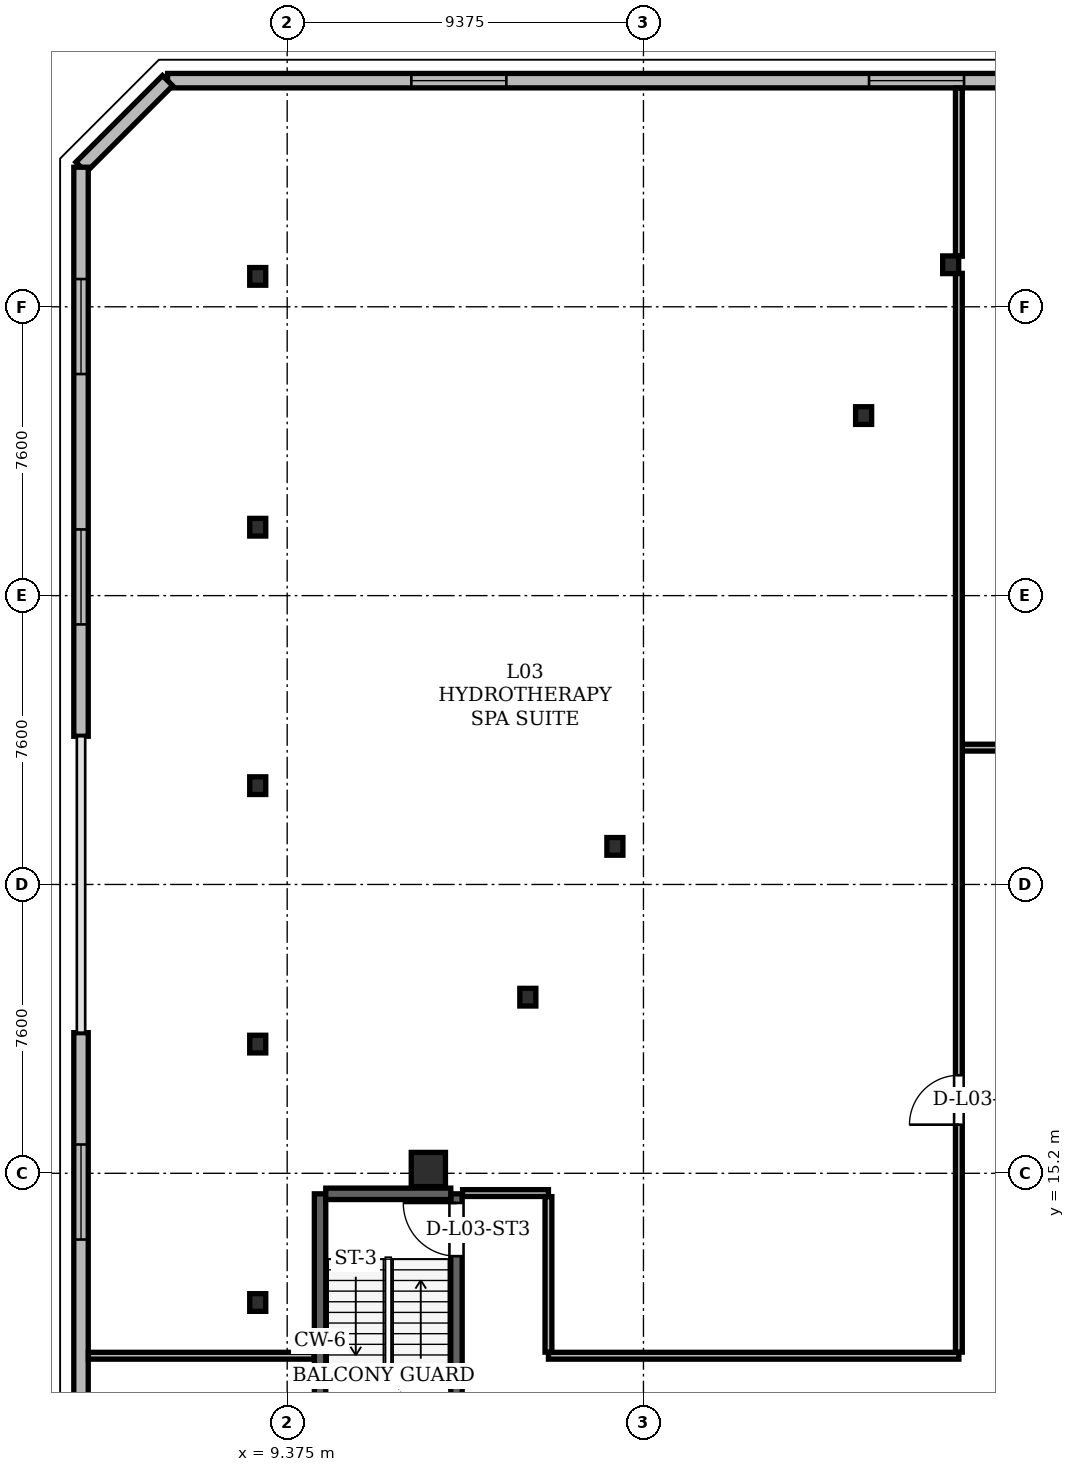
"""IFC4 building model, lengths in metres.
Left out: names, types, materials, properties, quantities, classifications, styles, units other than length and angle.
Written with IfcOpenShell. Run it as: python <this file> out.ifc"""

import sys

from ifc_helpers import new_model, si_unit, direction, frame, frame_2d, origin, origin_2d, place, context, subcontext, project, spatial, rectangle, hollow_rectangle, i_section, extrude, element, fill, save


model = new_model("IFC4")
c1 = context("Model", 3, precision=1e-05, world=origin(), true_north=direction((0.0, 1.0)))
c2 = subcontext(c1, "Body", "Model", "MODEL_VIEW")
j1 = project(units=[si_unit("LENGTHUNIT", "METRE"), si_unit("PLANEANGLEUNIT", "RADIAN")], contexts=[c1])
p1 = place(None, origin())
s1 = spatial("IfcSite", under=j1, at=p1, CompositionType="ELEMENT")
p2 = place(p1, origin())
s2 = spatial("IfcBuilding", under=s1, at=p2, CompositionType="ELEMENT")
p3 = place(p2, frame((0.0, 0.0, 14.1)))
s3 = spatial("IfcBuildingStorey", under=s2, at=p3, CompositionType="ELEMENT", Elevation=14.1)
p4 = place(p3, frame((13.09, 15.3, 0.004), z_axis=(0.0, 0.0, 1.0), x_axis=(1.0, 0.0, 0.0)))
e1 = element("IfcColumn", 1, at=p4, inside=s3, PredefinedType="COLUMN", context=c2, shape_type="SweptSolid", body=[
    extrude(hollow_rectangle(XDim=0.9, YDim=0.9, WallThickness=0.075, at=origin_2d()), origin(), (0.0, 0.0, 1.0), 4.191),
])
for number, where, z_axis, x_axis in (
    (2, (26.834, 39.106, 0.004), (0.0, 0.0, 1.0), (1.0, 0.0, 0.0)),
    (3, (24.543, 35.138, 0.004), (0.0, 0.0, 1.0), (1.0, 0.0, 0.0)),
    (4, (17.998, 23.802, 0.004), (0.0, 0.0, 1.0), (1.0, 0.0, 0.0)),
    (5, (15.708, 19.834, 0.004), (0.0, 0.0, 1.0), (1.0, 0.0, 0.0)),
):
    element("IfcColumn", number, at=place(p3, frame(where, z_axis=z_axis, x_axis=x_axis)), inside=s3, PredefinedType="COLUMN", context=c2, shape_type="SweptSolid", body=[
        extrude(i_section(OverallWidth=0.422, OverallDepth=0.465, WebThickness=0.045, FlangeThickness=0.072, at=origin_2d()), origin(), (0.0, 0.0, 1.0), 4.191),
    ])
for number, where, z_axis, x_axis in (
    (6, (8.6, 11.8, 0.0), (0.0, 0.0, 1.0), (1.0, 0.0, 0.0)),
    (7, (8.6, 18.6, 0.0), (0.0, 0.0, 1.0), (1.0, 0.0, 0.0)),
    (8, (8.6, 25.4, 0.0), (0.0, 0.0, 1.0), (1.0, 0.0, 0.0)),
    (9, (8.6, 32.2, 0.0), (0.0, 0.0, 1.0), (1.0, 0.0, 0.0)),
    (10, (8.6, 38.8, 0.0), (0.0, 0.0, 1.0), (1.0, 0.0, 0.0)),
):
    element("IfcColumn", number, at=place(p3, frame(where, z_axis=z_axis, x_axis=x_axis)), inside=s3, PredefinedType="COLUMN", context=c2, shape_type="SweptSolid", body=[
        extrude(i_section(OverallWidth=0.422, OverallDepth=0.465, WebThickness=0.045, FlangeThickness=0.072, at=origin_2d()), origin(), (0.0, 0.0, 1.0), 4.2),
    ])
p5 = place(p3, frame((10.24, 6.94, 0.0), z_axis=(0.0, 0.0, 1.0), x_axis=(0.0, 1.0, 0.0)))
e11 = element("IfcWall", 11, at=p5, inside=s3, PredefinedType="SHEAR", context=c2, shape_type="SweptSolid", body=[
    extrude(rectangle(XDim=7.72, YDim=0.3, at=frame_2d((3.86, 0.0))), origin(), (0.0, 0.0, 1.0), 3.92),
])
p6 = place(p3, frame((13.83, 6.94, 0.0), z_axis=(0.0, 0.0, 1.0), x_axis=(0.0, 1.0, 0.0)))
e12 = element("IfcWall", 12, at=p6, inside=s3, PredefinedType="SHEAR", context=c2, shape_type="SweptSolid", body=[
    extrude(rectangle(XDim=7.72, YDim=0.3, at=frame_2d((3.86, 0.0))), origin(), (0.0, 0.0, 1.0), 3.92),
])
p7 = place(p6, frame((6.08, 0.0, 0.0)))
e13 = element("IfcOpeningElement", 13, at=p7, cuts=e12, PredefinedType="OPENING", context=c2, shape_type="SweptSolid", body=[
    extrude(rectangle(XDim=1.4, YDim=2.2, at=frame_2d((0.7, 1.1))), frame((0.0, 0.15, 0.0), z_axis=(0.0, -1.0, 0.0), x_axis=(1.0, 0.0, 0.0)), (0.0, 0.0, 1.0), 0.3),
])
p8 = place(p3, frame((10.39, 14.66, 0.0), z_axis=(0.0, 0.0, 1.0), x_axis=(1.0, 0.0, 0.0)))
e14 = element("IfcWall", 14, at=p8, inside=s3, PredefinedType="SHEAR", context=c2, shape_type="SweptSolid", body=[
    extrude(rectangle(XDim=3.29, YDim=0.3, at=frame_2d((1.645, 0.0))), origin(), (0.0, 0.0, 1.0), 3.92),
])
p9 = place(p3, frame((33.6, 43.95, 0.0), z_axis=(0.0, 0.0, 1.0), x_axis=(-1.0, 0.0, 0.0)))
e15 = element("IfcWall", 15, at=p9, inside=s3, PredefinedType="SOLIDWALL", context=c2, shape_type="SweptSolid", body=[
    extrude(rectangle(XDim=27.372, YDim=0.38, at=frame_2d((13.686, 0.0))), origin(), (0.0, 0.0, 1.0), 3.054),
])
p10 = place(p9, frame((6.414, 0.0, 0.85)))
e16 = element("IfcOpeningElement", 16, at=p10, cuts=e15, PredefinedType="OPENING", context=c2, shape_type="SweptSolid", body=[
    extrude(rectangle(XDim=2.5, YDim=2.034, at=frame_2d((1.25, 1.017))), frame((0.0, 0.19, 0.0), z_axis=(0.0, -1.0, 0.0), x_axis=(1.0, 0.0, 0.0)), (0.0, 0.0, 1.0), 0.38),
])
p11 = place(p9, frame((18.458, 0.0, 0.85)))
e17 = element("IfcOpeningElement", 17, at=p11, cuts=e15, PredefinedType="OPENING", context=c2, shape_type="SweptSolid", body=[
    extrude(rectangle(XDim=2.5, YDim=2.034, at=frame_2d((1.25, 1.017))), frame((0.0, 0.19, 0.0), z_axis=(0.0, -1.0, 0.0), x_axis=(1.0, 0.0, 0.0)), (0.0, 0.0, 1.0), 0.38),
])
p12 = place(p3, frame((6.228, 43.95, 0.0), z_axis=(0.0, 0.0, 1.0), x_axis=(-0.707106781187, -0.707106781187, 0.0)))
e18 = element("IfcWall", 18, at=p12, inside=s3, PredefinedType="SOLIDWALL", context=c2, shape_type="SweptSolid", body=[
    extrude(rectangle(XDim=3.221, YDim=0.38, at=frame_2d((1.611, 0.0))), origin(), (0.0, 0.0, 1.0), 3.92),
])
p13 = place(p3, frame((3.95, 41.672, 0.0), z_axis=(0.0, 0.0, 1.0), x_axis=(0.0, -1.0, 0.0)))
e19 = element("IfcWall", 19, at=p13, inside=s3, PredefinedType="SOLIDWALL", context=c2, shape_type="SweptSolid", body=[
    extrude(rectangle(XDim=14.972, YDim=0.38, at=frame_2d((7.486, 0.0))), origin(), (0.0, 0.0, 1.0), 3.92),
])
p14 = place(p13, frame((2.942, 0.0, 0.85)))
e20 = element("IfcOpeningElement", 20, at=p14, cuts=e19, PredefinedType="OPENING", context=c2, shape_type="SweptSolid", body=[
    extrude(rectangle(XDim=2.5, YDim=2.15, at=frame_2d((1.25, 1.075))), frame((0.0, 0.19, 0.0), z_axis=(0.0, -1.0, 0.0), x_axis=(1.0, 0.0, 0.0)), (0.0, 0.0, 1.0), 0.38),
])
p15 = place(p13, frame((9.53, 0.0, 0.85)))
e21 = element("IfcOpeningElement", 21, at=p15, cuts=e19, PredefinedType="OPENING", context=c2, shape_type="SweptSolid", body=[
    extrude(rectangle(XDim=2.5, YDim=2.15, at=frame_2d((1.25, 1.075))), frame((0.0, 0.19, 0.0), z_axis=(0.0, -1.0, 0.0), x_axis=(1.0, 0.0, 0.0)), (0.0, 0.0, 1.0), 0.38),
])
p16 = place(p3, frame((3.95, 18.9, 0.0), z_axis=(0.0, 0.0, 1.0), x_axis=(0.0, -1.0, 0.0)))
e22 = element("IfcWall", 22, at=p16, inside=s3, PredefinedType="SOLIDWALL", context=c2, shape_type="SweptSolid", body=[
    extrude(rectangle(XDim=14.972, YDim=0.38, at=frame_2d((7.486, 0.0))), origin(), (0.0, 0.0, 1.0), 3.92),
])
p17 = place(p16, frame((2.942, 0.0, 0.85)))
e23 = element("IfcOpeningElement", 23, at=p17, cuts=e22, PredefinedType="OPENING", context=c2, shape_type="SweptSolid", body=[
    extrude(rectangle(XDim=2.5, YDim=2.15, at=frame_2d((1.25, 1.075))), frame((0.0, 0.19, 0.0), z_axis=(0.0, -1.0, 0.0), x_axis=(1.0, 0.0, 0.0)), (0.0, 0.0, 1.0), 0.38),
])
p18 = place(p16, frame((9.53, 0.0, 0.85)))
e24 = element("IfcOpeningElement", 24, at=p18, cuts=e22, PredefinedType="OPENING", context=c2, shape_type="SweptSolid", body=[
    extrude(rectangle(XDim=2.5, YDim=2.15, at=frame_2d((1.25, 1.075))), frame((0.0, 0.19, 0.0), z_axis=(0.0, -1.0, 0.0), x_axis=(1.0, 0.0, 0.0)), (0.0, 0.0, 1.0), 0.38),
])
p19 = place(p3, frame((4.144, 10.4, 0.0), z_axis=(0.0, 0.0, 1.0), x_axis=(1.0, 0.0, 0.0)))
e25 = element("IfcWall", 25, at=p19, inside=s3, PredefinedType="PARTITIONING", context=c2, shape_type="SweptSolid", body=[
    extrude(rectangle(XDim=5.936, YDim=0.18, at=frame_2d((2.968, 0.0))), origin(), (0.0, 0.0, 1.0), 2.53),
])
p20 = place(p3, frame((16.25, 10.4, 0.0), z_axis=(0.0, 0.0, 1.0), x_axis=(1.0, 0.0, 0.0)))
e26 = element("IfcWall", 26, at=p20, inside=s3, PredefinedType="PARTITIONING", context=c2, shape_type="SweptSolid", body=[
    extrude(rectangle(XDim=10.8, YDim=0.18, at=frame_2d((5.4, 0.0))), origin(), (0.0, 0.0, 1.0), 3.92),
])
p21 = place(p3, frame((13.99, 14.68, 0.0), z_axis=(0.0, 0.0, 1.0), x_axis=(1.0, 0.0, 0.0)))
e27 = element("IfcWall", 27, at=p21, inside=s3, PredefinedType="PARTITIONING", context=c2, shape_type="SweptSolid", body=[
    extrude(rectangle(XDim=2.26, YDim=0.18, at=frame_2d((1.13, 0.0))), origin(), (0.0, 0.0, 1.0), 2.983),
])
p22 = place(p3, frame((27.05, 26.4, 0.0), z_axis=(0.0, 0.0, 1.0), x_axis=(1.0, 0.0, 0.0)))
e28 = element("IfcWall", 28, at=p22, inside=s3, PredefinedType="PARTITIONING", context=c2, shape_type="SweptSolid", body=[
    extrude(rectangle(XDim=28.55, YDim=0.18, at=frame_2d((14.275, 0.0))), origin(), (0.0, 0.0, 1.0), 2.983),
])
p23 = place(p22, frame((7.776, 0.0, 0.0)))
e29 = element("IfcOpeningElement", 29, at=p23, cuts=e28, PredefinedType="OPENING", context=c2, shape_type="SweptSolid", body=[
    extrude(rectangle(XDim=1.3, YDim=2.2, at=frame_2d((0.65, 1.1))), frame((0.0, 0.09, 0.0), z_axis=(0.0, -1.0, 0.0), x_axis=(1.0, 0.0, 0.0)), (0.0, 0.0, 1.0), 0.18),
])
p24 = place(p22, frame((19.437, 0.0, 0.0)))
e30 = element("IfcOpeningElement", 30, at=p24, cuts=e28, PredefinedType="OPENING", context=c2, shape_type="SweptSolid", body=[
    extrude(rectangle(XDim=0.88, YDim=2.08, at=frame_2d((0.44, 1.04))), frame((0.0, 0.09, 0.0), z_axis=(0.0, -1.0, 0.0), x_axis=(1.0, 0.0, 0.0)), (0.0, 0.0, 1.0), 0.18),
])
p25 = place(p22, frame((24.688, 0.0, 0.0)))
e31 = element("IfcOpeningElement", 31, at=p25, cuts=e28, PredefinedType="OPENING", context=c2, shape_type="SweptSolid", body=[
    extrude(rectangle(XDim=0.88, YDim=2.08, at=frame_2d((0.44, 1.04))), frame((0.0, 0.09, 0.0), z_axis=(0.0, -1.0, 0.0), x_axis=(1.0, 0.0, 0.0)), (0.0, 0.0, 1.0), 0.18),
])
p26 = place(p3, frame((16.25, 10.494, 0.0), z_axis=(0.0, 0.0, 1.0), x_axis=(0.0, 1.0, 0.0)))
e32 = element("IfcWall", 32, at=p26, inside=s3, PredefinedType="PARTITIONING", context=c2, shape_type="SweptSolid", body=[
    extrude(rectangle(XDim=4.092, YDim=0.18, at=frame_2d((2.046, 0.0))), origin(), (0.0, 0.0, 1.0), 2.983),
])
p27 = place(p3, frame((27.05, 10.494, 0.0), z_axis=(0.0, 0.0, 1.0), x_axis=(0.0, 1.0, 0.0)))
e33 = element("IfcWall", 33, at=p27, inside=s3, PredefinedType="PARTITIONING", context=c2, shape_type="SweptSolid", body=[
    extrude(rectangle(XDim=28.386, YDim=0.18, at=frame_2d((14.193, 0.0))), origin(), (0.0, 0.0, 1.0), 2.983),
])
p28 = place(p27, frame((5.985, 0.0, 0.0)))
e34 = element("IfcOpeningElement", 34, at=p28, cuts=e33, PredefinedType="OPENING", context=c2, shape_type="SweptSolid", body=[
    extrude(rectangle(XDim=1.3, YDim=2.2, at=frame_2d((0.65, 1.1))), frame((0.0, 0.09, 0.0), z_axis=(0.0, -1.0, 0.0), x_axis=(1.0, 0.0, 0.0)), (0.0, 0.0, 1.0), 0.18),
])
p29 = place(p3, frame((27.05, 39.332, 0.0), z_axis=(0.0, 0.0, 1.0), x_axis=(0.0, 1.0, 0.0)))
e35 = element("IfcWall", 35, at=p29, inside=s3, PredefinedType="PARTITIONING", context=c2, shape_type="SweptSolid", body=[
    extrude(rectangle(XDim=4.425, YDim=0.18, at=frame_2d((2.212, 0.0))), origin(), (0.0, 0.0, 1.0), 3.054),
])
p30 = place(p10, origin())
e36 = element("IfcWindow", 36, at=p30, inside=s3, PartitioningType="SINGLE_PANEL", PredefinedType="WINDOW", context=c2, shape_type="SweptSolid", body=[
    extrude(rectangle(XDim=2.5, YDim=2.034, at=frame_2d((1.25, 1.017))), frame((0.0, 0.03, 0.0), z_axis=(0.0, -1.0, 0.0), x_axis=(1.0, 0.0, 0.0)), (0.0, 0.0, 1.0), 0.06),
])
fill(e16, e36)
p31 = place(p11, origin())
e37 = element("IfcWindow", 37, at=p31, inside=s3, PartitioningType="SINGLE_PANEL", PredefinedType="WINDOW", context=c2, shape_type="SweptSolid", body=[
    extrude(rectangle(XDim=2.5, YDim=2.034, at=frame_2d((1.25, 1.017))), frame((0.0, 0.03, 0.0), z_axis=(0.0, -1.0, 0.0), x_axis=(1.0, 0.0, 0.0)), (0.0, 0.0, 1.0), 0.06),
])
fill(e17, e37)
p32 = place(p14, origin())
e38 = element("IfcWindow", 38, at=p32, inside=s3, PartitioningType="SINGLE_PANEL", PredefinedType="WINDOW", context=c2, shape_type="SweptSolid", body=[
    extrude(rectangle(XDim=2.5, YDim=2.15, at=frame_2d((1.25, 1.075))), frame((0.0, 0.03, 0.0), z_axis=(0.0, -1.0, 0.0), x_axis=(1.0, 0.0, 0.0)), (0.0, 0.0, 1.0), 0.06),
])
fill(e20, e38)
p33 = place(p15, origin())
e39 = element("IfcWindow", 39, at=p33, inside=s3, PartitioningType="SINGLE_PANEL", PredefinedType="WINDOW", context=c2, shape_type="SweptSolid", body=[
    extrude(rectangle(XDim=2.5, YDim=2.15, at=frame_2d((1.25, 1.075))), frame((0.0, 0.03, 0.0), z_axis=(0.0, -1.0, 0.0), x_axis=(1.0, 0.0, 0.0)), (0.0, 0.0, 1.0), 0.06),
])
fill(e21, e39)
p34 = place(p17, origin())
e40 = element("IfcWindow", 40, at=p34, inside=s3, PartitioningType="SINGLE_PANEL", PredefinedType="WINDOW", context=c2, shape_type="SweptSolid", body=[
    extrude(rectangle(XDim=2.5, YDim=2.15, at=frame_2d((1.25, 1.075))), frame((0.0, 0.03, 0.0), z_axis=(0.0, -1.0, 0.0), x_axis=(1.0, 0.0, 0.0)), (0.0, 0.0, 1.0), 0.06),
])
fill(e23, e40)
p35 = place(p7, origin())
e41 = element("IfcDoor", 41, at=p35, inside=s3, OperationType="SINGLE_SWING_RIGHT", PredefinedType="DOOR", context=c2, shape_type="SweptSolid", body=[
    extrude(rectangle(XDim=1.4, YDim=2.2, at=frame_2d((0.7, 1.1))), frame((0.0, 0.025, 0.0), z_axis=(0.0, -1.0, 0.0), x_axis=(1.0, 0.0, 0.0)), (0.0, 0.0, 1.0), 0.05),
])
fill(e13, e41)
p36 = place(p28, origin())
e42 = element("IfcDoor", 42, at=p36, inside=s3, OperationType="SINGLE_SWING_LEFT", PredefinedType="DOOR", context=c2, shape_type="SweptSolid", body=[
    extrude(rectangle(XDim=1.3, YDim=2.2, at=frame_2d((0.65, 1.1))), frame((0.0, 0.025, 0.0), z_axis=(0.0, -1.0, 0.0), x_axis=(1.0, 0.0, 0.0)), (0.0, 0.0, 1.0), 0.05),
])
fill(e34, e42)
save(model, sys.argv[1])
